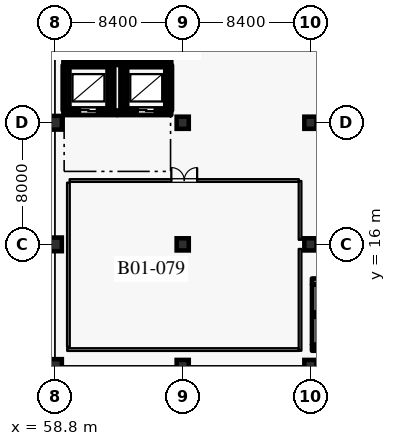
"""IFC4 building model, lengths in metres.
Left out: names, types, materials, properties, quantities, classifications, styles, units other than length and angle.
Written with IfcOpenShell. Run it as: python <this file> out.ifc"""

import sys

from ifc_helpers import new_model, si_unit, direction, frame, frame_2d, origin, origin_2d, place, context, subcontext, project, spatial, rectangle, hollow_rectangle, extrude, element, fill, save


model = new_model("IFC4")
c1 = context("Model", 3, precision=1e-05, world=origin(), true_north=direction((0.0, 1.0)))
c2 = subcontext(c1, "Body", "Model", "MODEL_VIEW")
j1 = project(units=[si_unit("LENGTHUNIT", "METRE"), si_unit("PLANEANGLEUNIT", "RADIAN")], contexts=[c1])
p1 = place(None, origin())
s1 = spatial("IfcSite", under=j1, at=p1, CompositionType="ELEMENT")
p2 = place(p1, origin())
s2 = spatial("IfcBuilding", under=s1, at=p2, CompositionType="ELEMENT")
p3 = place(p2, frame((0.0, 0.0, -5.4)))
s3 = spatial("IfcBuildingStorey", under=s2, at=p3, CompositionType="ELEMENT", Elevation=-5.4)
for number, where, z_axis, x_axis in (
    (1, (58.8, 8.0, 0.0), (0.0, 0.0, 1.0), (1.0, 0.0, 0.0)),
    (2, (58.8, 16.0, 0.0), (0.0, 0.0, 1.0), (1.0, 0.0, 0.0)),
    (3, (58.8, 24.0, 0.0), (0.0, 0.0, 1.0), (1.0, 0.0, 0.0)),
):
    element("IfcColumn", number, at=place(p3, frame(where, z_axis=z_axis, x_axis=x_axis)), inside=s3, PredefinedType="COLUMN", context=c2, shape_type="SweptSolid", body=[
        extrude(rectangle(XDim=0.9, YDim=0.9, at=origin_2d()), origin(), (0.0, 0.0, 1.0), 5.4),
    ])
for number, where, z_axis, x_axis in (
    (4, (67.2, 8.0, 0.0), (0.0, 0.0, 1.0), (1.0, 0.0, 0.0)),
    (5, (67.2, 16.0, 0.0), (0.0, 0.0, 1.0), (1.0, 0.0, 0.0)),
    (6, (67.2, 24.0, 0.0), (0.0, 0.0, 1.0), (1.0, 0.0, 0.0)),
    (7, (75.6, 8.0, 0.0), (0.0, 0.0, 1.0), (1.0, 0.0, 0.0)),
    (8, (75.6, 16.0, 0.0), (0.0, 0.0, 1.0), (1.0, 0.0, 0.0)),
    (9, (75.6, 24.0, 0.0), (0.0, 0.0, 1.0), (1.0, 0.0, 0.0)),
):
    element("IfcColumn", number, at=place(p3, frame(where, z_axis=z_axis, x_axis=x_axis)), inside=s3, PredefinedType="COLUMN", context=c2, shape_type="SweptSolid", body=[
        extrude(rectangle(XDim=0.8, YDim=0.8, at=origin_2d()), origin(), (0.0, 0.0, 1.0), 5.4),
    ])
p4 = place(p3, frame((59.35, 24.65, -1.4), z_axis=(0.0, 0.0, 1.0), x_axis=(1.0, 0.0, 0.0)))
e10 = element("IfcWall", 10, at=p4, inside=s3, PredefinedType="USERDEFINED", context=c2, shape_type="SweptSolid", body=[
    extrude(rectangle(XDim=3.55, YDim=0.3, at=frame_2d((1.775, 0.0))), origin(), (0.0, 0.0, 1.0), 1.4),
])
p5 = place(p3, frame((62.55, 24.81, -1.4), z_axis=(0.0, 0.0, 1.0), x_axis=(0.0, 1.0, 0.0)))
e11 = element("IfcWall", 11, at=p5, inside=s3, PredefinedType="USERDEFINED", context=c2, shape_type="SweptSolid", body=[
    extrude(rectangle(XDim=2.98, YDim=0.3, at=frame_2d((1.49, 0.0))), origin(), (0.0, 0.0, 1.0), 1.4),
])
p6 = place(p3, frame((62.9, 27.95, -1.4), z_axis=(0.0, 0.0, 1.0), x_axis=(-1.0, 0.0, 0.0)))
e12 = element("IfcWall", 12, at=p6, inside=s3, PredefinedType="USERDEFINED", context=c2, shape_type="SweptSolid", body=[
    extrude(rectangle(XDim=3.55, YDim=0.3, at=frame_2d((1.775, 0.0))), origin(), (0.0, 0.0, 1.0), 1.4),
])
p7 = place(p3, frame((59.45, 27.79, -1.4), z_axis=(0.0, 0.0, 1.0), x_axis=(0.0, -1.0, 0.0)))
e13 = element("IfcWall", 13, at=p7, inside=s3, PredefinedType="USERDEFINED", context=c2, shape_type="SweptSolid", body=[
    extrude(rectangle(XDim=2.98, YDim=0.3, at=frame_2d((1.49, 0.0))), origin(), (0.0, 0.0, 1.0), 1.4),
])
p8 = place(p3, frame((62.9, 24.65, -1.4), z_axis=(0.0, 0.0, 1.0), x_axis=(1.0, 0.0, 0.0)))
e14 = element("IfcWall", 14, at=p8, inside=s3, PredefinedType="USERDEFINED", context=c2, shape_type="SweptSolid", body=[
    extrude(rectangle(XDim=3.55, YDim=0.3, at=frame_2d((1.775, 0.0))), origin(), (0.0, 0.0, 1.0), 1.4),
])
p9 = place(p3, frame((66.35, 24.81, -1.4), z_axis=(0.0, 0.0, 1.0), x_axis=(0.0, 1.0, 0.0)))
e15 = element("IfcWall", 15, at=p9, inside=s3, PredefinedType="USERDEFINED", context=c2, shape_type="SweptSolid", body=[
    extrude(rectangle(XDim=2.98, YDim=0.3, at=frame_2d((1.49, 0.0))), origin(), (0.0, 0.0, 1.0), 1.4),
])
p10 = place(p3, frame((66.45, 27.95, -1.4), z_axis=(0.0, 0.0, 1.0), x_axis=(-1.0, 0.0, 0.0)))
e16 = element("IfcWall", 16, at=p10, inside=s3, PredefinedType="USERDEFINED", context=c2, shape_type="SweptSolid", body=[
    extrude(rectangle(XDim=3.55, YDim=0.3, at=frame_2d((1.775, 0.0))), origin(), (0.0, 0.0, 1.0), 1.4),
])
p11 = place(p3, frame((63.25, 27.79, -1.4), z_axis=(0.0, 0.0, 1.0), x_axis=(0.0, -1.0, 0.0)))
e17 = element("IfcWall", 17, at=p11, inside=s3, PredefinedType="USERDEFINED", context=c2, shape_type="SweptSolid", body=[
    extrude(rectangle(XDim=2.98, YDim=0.3, at=frame_2d((1.49, 0.0))), origin(), (0.0, 0.0, 1.0), 1.4),
])
p12 = place(p3, frame((59.45, 24.8, 0.0), z_axis=(0.0, 0.0, 1.0), x_axis=(1.0, 0.0, 0.0)))
e18 = element("IfcWall", 18, at=p12, inside=s3, PredefinedType="SHEAR", context=c2, shape_type="SweptSolid", body=[
    extrude(rectangle(XDim=3.1, YDim=0.3, at=frame_2d((1.55, 0.0))), origin(), (0.0, 0.0, 1.0), 4.995),
])
p13 = place(p12, frame((1.0, 0.0, 0.0)))
e19 = element("IfcOpeningElement", 19, at=p13, cuts=e18, PredefinedType="OPENING", context=c2, shape_type="SweptSolid", body=[
    extrude(rectangle(XDim=1.1, YDim=2.2, at=frame_2d((0.55, 1.1))), frame((0.0, 0.16, 0.0), z_axis=(0.0, -1.0, 0.0), x_axis=(1.0, 0.0, 0.0)), (0.0, 0.0, 1.0), 0.32),
])
p14 = place(p3, frame((62.4, 24.955, 0.0), z_axis=(0.0, 0.0, 1.0), x_axis=(0.0, 1.0, 0.0)))
e20 = element("IfcWall", 20, at=p14, inside=s3, PredefinedType="SHEAR", context=c2, shape_type="SweptSolid", body=[
    extrude(rectangle(XDim=2.69, YDim=0.3, at=frame_2d((1.345, 0.0))), origin(), (0.0, 0.0, 1.0), 4.995),
])
p15 = place(p3, frame((62.55, 27.8, 0.0), z_axis=(0.0, 0.0, 1.0), x_axis=(-1.0, 0.0, 0.0)))
e21 = element("IfcWall", 21, at=p15, inside=s3, PredefinedType="SHEAR", context=c2, shape_type="SweptSolid", body=[
    extrude(rectangle(XDim=3.1, YDim=0.3, at=frame_2d((1.55, 0.0))), origin(), (0.0, 0.0, 1.0), 4.995),
])
p16 = place(p3, frame((59.6, 27.645, 0.0), z_axis=(0.0, 0.0, 1.0), x_axis=(0.0, -1.0, 0.0)))
e22 = element("IfcWall", 22, at=p16, inside=s3, PredefinedType="SHEAR", context=c2, shape_type="SweptSolid", body=[
    extrude(rectangle(XDim=2.69, YDim=0.3, at=frame_2d((1.345, 0.0))), origin(), (0.0, 0.0, 1.0), 4.995),
])
p17 = place(p3, frame((63.25, 24.8, 0.0), z_axis=(0.0, 0.0, 1.0), x_axis=(1.0, 0.0, 0.0)))
e23 = element("IfcWall", 23, at=p17, inside=s3, PredefinedType="SHEAR", context=c2, shape_type="SweptSolid", body=[
    extrude(rectangle(XDim=3.1, YDim=0.3, at=frame_2d((1.55, 0.0))), origin(), (0.0, 0.0, 1.0), 4.995),
])
p18 = place(p17, frame((1.0, 0.0, 0.0)))
e24 = element("IfcOpeningElement", 24, at=p18, cuts=e23, PredefinedType="OPENING", context=c2, shape_type="SweptSolid", body=[
    extrude(rectangle(XDim=1.1, YDim=2.2, at=frame_2d((0.55, 1.1))), frame((0.0, 0.16, 0.0), z_axis=(0.0, -1.0, 0.0), x_axis=(1.0, 0.0, 0.0)), (0.0, 0.0, 1.0), 0.32),
])
p19 = place(p3, frame((66.2, 24.955, 0.0), z_axis=(0.0, 0.0, 1.0), x_axis=(0.0, 1.0, 0.0)))
e25 = element("IfcWall", 25, at=p19, inside=s3, PredefinedType="SHEAR", context=c2, shape_type="SweptSolid", body=[
    extrude(rectangle(XDim=2.69, YDim=0.3, at=frame_2d((1.345, 0.0))), origin(), (0.0, 0.0, 1.0), 4.995),
])
p20 = place(p3, frame((66.35, 27.8, 0.0), z_axis=(0.0, 0.0, 1.0), x_axis=(-1.0, 0.0, 0.0)))
e26 = element("IfcWall", 26, at=p20, inside=s3, PredefinedType="SHEAR", context=c2, shape_type="SweptSolid", body=[
    extrude(rectangle(XDim=3.1, YDim=0.3, at=frame_2d((1.55, 0.0))), origin(), (0.0, 0.0, 1.0), 4.995),
])
p21 = place(p3, frame((63.4, 27.645, 0.0), z_axis=(0.0, 0.0, 1.0), x_axis=(0.0, -1.0, 0.0)))
e27 = element("IfcWall", 27, at=p21, inside=s3, PredefinedType="SHEAR", context=c2, shape_type="SweptSolid", body=[
    extrude(rectangle(XDim=2.69, YDim=0.3, at=frame_2d((1.345, 0.0))), origin(), (0.0, 0.0, 1.0), 4.995),
])
p22 = place(p3, frame((75.7, 9.2, 0.0), z_axis=(0.0, 0.0, 1.0), x_axis=(1.0, 0.0, 0.0)))
e28 = element("IfcWall", 28, at=p22, inside=s3, PredefinedType="SHEAR", context=c2, shape_type="SweptSolid", body=[
    extrude(rectangle(XDim=8.2, YDim=0.4, at=frame_2d((4.1, 0.0))), origin(), (0.0, 0.0, 1.0), 4.995),
])
p23 = place(p3, frame((75.7, 13.56, 0.0), z_axis=(0.0, 0.0, 1.0), x_axis=(1.0, 0.0, 0.0)))
e29 = element("IfcWall", 29, at=p23, inside=s3, PredefinedType="SHEAR", context=c2, shape_type="SweptSolid", body=[
    extrude(rectangle(XDim=8.2, YDim=0.4, at=frame_2d((4.1, 0.0))), origin(), (0.0, 0.0, 1.0), 4.995),
])
p24 = place(p23, frame((0.62, 0.0, 0.0)))
e30 = element("IfcOpeningElement", 30, at=p24, cuts=e29, PredefinedType="OPENING", context=c2, shape_type="SweptSolid", body=[
    extrude(rectangle(XDim=1.16, YDim=2.2, at=frame_2d((0.58, 1.1))), frame((0.0, 0.21, 0.0), z_axis=(0.0, -1.0, 0.0), x_axis=(1.0, 0.0, 0.0)), (0.0, 0.0, 1.0), 0.42),
])
p25 = place(p3, frame((75.9, 9.405, 0.0), z_axis=(0.0, 0.0, 1.0), x_axis=(0.0, 1.0, 0.0)))
e31 = element("IfcWall", 31, at=p25, inside=s3, PredefinedType="SHEAR", context=c2, shape_type="SweptSolid", body=[
    extrude(rectangle(XDim=3.95, YDim=0.4, at=frame_2d((1.975, 0.0))), origin(), (0.0, 0.0, 1.0), 4.995),
])
for number, where, z_axis, x_axis in (
    (32, (76.08, 9.2, 0.0), (0.0, 0.0, 1.0), (1.0, 0.0, 0.0)),
    (33, (76.08, 11.38, 0.0), (0.0, 0.0, 1.0), (1.0, 0.0, 0.0)),
):
    element("IfcColumn", number, at=place(p3, frame(where, z_axis=z_axis, x_axis=x_axis)), inside=s3, PredefinedType="COLUMN", context=c2, shape_type="SweptSolid", body=[
        extrude(hollow_rectangle(XDim=0.3, YDim=0.3, WallThickness=0.012, at=origin_2d()), origin(), (0.0, 0.0, 1.0), 5.22),
    ])
p26 = place(p3, frame((59.76, 20.2, 0.0), z_axis=(0.0, 0.0, 1.0), x_axis=(1.0, 0.0, 0.0)))
e34 = element("IfcWall", 34, at=p26, inside=s3, PredefinedType="PARTITIONING", context=c2, shape_type="SweptSolid", body=[
    extrude(rectangle(XDim=15.08, YDim=0.18, at=frame_2d((7.54, 0.0))), origin(), (0.0, 0.0, 1.0), 4.995),
])
p27 = place(p26, frame((6.69, 0.0, 0.0)))
e35 = element("IfcOpeningElement", 35, at=p27, cuts=e34, PredefinedType="OPENING", context=c2, shape_type="SweptSolid", body=[
    extrude(rectangle(XDim=1.7, YDim=2.3, at=frame_2d((0.85, 1.15))), frame((0.0, 0.1, 0.0), z_axis=(0.0, -1.0, 0.0), x_axis=(1.0, 0.0, 0.0)), (0.0, 0.0, 1.0), 0.2),
])
p28 = place(p3, frame((59.68, 9.25, 0.0), z_axis=(0.0, 0.0, 1.0), x_axis=(0.0, 1.0, 0.0)))
e36 = element("IfcWall", 36, at=p28, inside=s3, PredefinedType="PARTITIONING", context=c2, shape_type="SweptSolid", body=[
    extrude(rectangle(XDim=10.81, YDim=0.18, at=frame_2d((5.405, 0.0))), origin(), (0.0, 0.0, 1.0), 4.995),
])
p29 = place(p3, frame((74.92, 9.0, 0.0), z_axis=(0.0, 0.0, 1.0), x_axis=(0.0, 1.0, 0.0)))
e37 = element("IfcWall", 37, at=p29, inside=s3, PredefinedType="PARTITIONING", context=c2, shape_type="SweptSolid", body=[
    extrude(rectangle(XDim=6.7, YDim=0.18, at=frame_2d((3.35, 0.0))), origin(), (0.0, 0.0, 1.0), 4.995),
])
p30 = place(p3, frame((74.92, 16.3, 0.0), z_axis=(0.0, 0.0, 1.0), x_axis=(0.0, 1.0, 0.0)))
e38 = element("IfcWall", 38, at=p30, inside=s3, PredefinedType="PARTITIONING", context=c2, shape_type="SweptSolid", body=[
    extrude(rectangle(XDim=3.868, YDim=0.18, at=frame_2d((1.934, 0.0))), origin(), (0.0, 0.0, 1.0), 4.995),
])
p31 = place(p3, frame((59.6, 9.08, 0.0), z_axis=(0.0, 0.0, 1.0), x_axis=(1.0, 0.0, 0.0)))
e39 = element("IfcWall", 39, at=p31, inside=s3, PredefinedType="PARTITIONING", context=c2, shape_type="SweptSolid", body=[
    extrude(rectangle(XDim=15.23, YDim=0.18, at=frame_2d((7.615, 0.0))), origin(), (0.0, 0.0, 1.0), 4.995),
])
p32 = place(p13, origin())
e40 = element("IfcDoor", 40, at=p32, inside=s3, OperationType="DOUBLE_DOOR_SLIDING", PredefinedType="DOOR", context=c2, shape_type="SweptSolid", body=[
    extrude(rectangle(XDim=1.1, YDim=2.2, at=frame_2d((0.55, 1.1))), frame((0.0, 0.025, 0.0), z_axis=(0.0, -1.0, 0.0), x_axis=(1.0, 0.0, 0.0)), (0.0, 0.0, 1.0), 0.05),
])
fill(e19, e40)
p33 = place(p18, origin())
e41 = element("IfcDoor", 41, at=p33, inside=s3, OperationType="DOUBLE_DOOR_SLIDING", PredefinedType="DOOR", context=c2, shape_type="SweptSolid", body=[
    extrude(rectangle(XDim=1.1, YDim=2.2, at=frame_2d((0.55, 1.1))), frame((0.0, 0.025, 0.0), z_axis=(0.0, -1.0, 0.0), x_axis=(1.0, 0.0, 0.0)), (0.0, 0.0, 1.0), 0.05),
])
fill(e24, e41)
p34 = place(p27, origin())
e42 = element("IfcDoor", 42, at=p34, inside=s3, OperationType="DOUBLE_DOOR_SINGLE_SWING", PredefinedType="DOOR", context=c2, shape_type="SweptSolid", body=[
    extrude(rectangle(XDim=1.7, YDim=2.3, at=frame_2d((0.85, 1.15))), frame((0.0, 0.025, 0.0), z_axis=(0.0, -1.0, 0.0), x_axis=(1.0, 0.0, 0.0)), (0.0, 0.0, 1.0), 0.05),
])
fill(e35, e42)
save(model, sys.argv[1])
